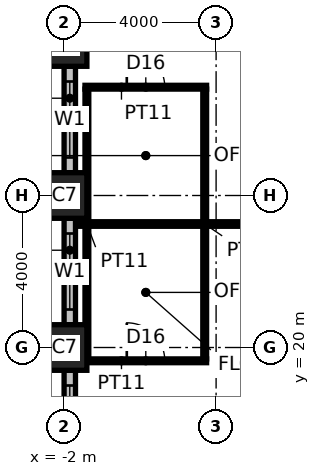
"""IFC4 building model, lengths in metres.
Left out: names, types, materials, properties, quantities, classifications, styles, units other than length and angle.
Written with IfcOpenShell. Run it as: python <this file> out.ifc"""

import sys

from ifc_helpers import new_model, si_unit, direction, frame, frame_2d, origin, origin_2d, place, context, subcontext, project, spatial, rectangle, hollow_rectangle, extrude, element, fill, save


model = new_model("IFC4")
c1 = context("Model", 3, precision=1e-05, world=origin(), true_north=direction((0.0, 1.0)))
c2 = subcontext(c1, "Body", "Model", "MODEL_VIEW")
j1 = project(units=[si_unit("LENGTHUNIT", "METRE"), si_unit("PLANEANGLEUNIT", "RADIAN")], contexts=[c1])
p1 = place(None, origin())
s1 = spatial("IfcSite", under=j1, at=p1, CompositionType="ELEMENT")
p2 = place(p1, origin())
s2 = spatial("IfcBuilding", under=s1, at=p2, CompositionType="ELEMENT")
p3 = place(p2, frame((0.0, 0.0, 27.0)))
s3 = spatial("IfcBuildingStorey", under=s2, at=p3, CompositionType="ELEMENT", Elevation=27.0)
for number, where, z_axis, x_axis in (
    (1, (-2.0, 20.0, 0.0), (0.0, 0.0, 1.0), (1.0, 0.0, 0.0)),
    (2, (-2.0, 24.0, 0.0), (0.0, 0.0, 1.0), (1.0, 0.0, 0.0)),
    (3, (-2.0, 28.0, 0.0), (0.0, 0.0, 1.0), (1.0, 0.0, 0.0)),
):
    element("IfcColumn", number, at=place(p3, frame(where, z_axis=z_axis, x_axis=x_axis)), inside=s3, PredefinedType="COLUMN", context=c2, shape_type="SweptSolid", body=[
        extrude(hollow_rectangle(XDim=1.2, YDim=1.2, WallThickness=0.1, at=origin_2d()), origin(), (0.0, 0.0, 1.0), 4.0),
    ])
p4 = place(p3, frame((-1.7, 23.25, 0.0), z_axis=(0.0, 0.0, 1.0), x_axis=(1.0, 0.0, 0.0)))
e4 = element("IfcWall", 4, at=p4, inside=s3, PredefinedType="PARTITIONING", context=c2, shape_type="SweptSolid", body=[
    extrude(rectangle(XDim=16.725, YDim=0.12, at=frame_2d((8.362, 0.0))), origin(), (0.0, 0.0, 1.0), 3.85),
])
p5 = place(p3, frame((-1.45, 19.65, 0.0), z_axis=(0.0, 0.0, 1.0), x_axis=(1.0, 0.0, 0.0)))
e5 = element("IfcWall", 5, at=p5, inside=s3, PredefinedType="PARTITIONING", context=c2, shape_type="SweptSolid", body=[
    extrude(rectangle(XDim=3.2, YDim=0.1, at=frame_2d((1.6, 0.0))), origin(), (0.0, 0.0, 1.0), 2.85),
])
p6 = place(p5, frame((1.1, 0.0, 0.0)))
e6 = element("IfcOpeningElement", 6, at=p6, cuts=e5, PredefinedType="OPENING", context=c2, shape_type="SweptSolid", body=[
    extrude(rectangle(XDim=1.0, YDim=2.2, at=frame_2d((0.5, 1.1))), frame((0.0, 0.06, 0.0), z_axis=(0.0, -1.0, 0.0), x_axis=(1.0, 0.0, 0.0)), (0.0, 0.0, 1.0), 0.12),
])
p7 = place(p3, frame((-1.45, 26.85, 0.0), z_axis=(0.0, 0.0, 1.0), x_axis=(1.0, 0.0, 0.0)))
e7 = element("IfcWall", 7, at=p7, inside=s3, PredefinedType="PARTITIONING", context=c2, shape_type="SweptSolid", body=[
    extrude(rectangle(XDim=3.2, YDim=0.1, at=frame_2d((1.6, 0.0))), origin(), (0.0, 0.0, 1.0), 3.85),
])
p8 = place(p7, frame((1.1, 0.0, 0.0)))
e8 = element("IfcOpeningElement", 8, at=p8, cuts=e7, PredefinedType="OPENING", context=c2, shape_type="SweptSolid", body=[
    extrude(rectangle(XDim=1.0, YDim=2.2, at=frame_2d((0.5, 1.1))), frame((0.0, 0.06, 0.0), z_axis=(0.0, -1.0, 0.0), x_axis=(1.0, 0.0, 0.0)), (0.0, 0.0, 1.0), 0.12),
])
for number, where, z_axis, x_axis in (
    (9, (-1.4, 19.7, 0.0), (0.0, 0.0, 1.0), (0.0, 1.0, 0.0)),
    (10, (1.7, 19.7, 0.0), (0.0, 0.0, 1.0), (0.0, 1.0, 0.0)),
):
    element("IfcWall", number, at=place(p3, frame(where, z_axis=z_axis, x_axis=x_axis)), inside=s3, PredefinedType="PARTITIONING", context=c2, shape_type="SweptSolid", body=[
        extrude(rectangle(XDim=7.1, YDim=0.1, at=frame_2d((3.55, 0.0))), origin(), (0.0, 0.0, 1.0), 3.85),
    ])
p9 = place(p3, frame((-1.85, 19.4, 0.0), z_axis=(0.0, 0.0, 1.0), x_axis=(0.0, -1.0, 0.0)))
e11 = element("IfcWall", 11, at=p9, inside=s3, PredefinedType="ELEMENTEDWALL", context=c2, shape_type="SweptSolid", body=[
    extrude(rectangle(XDim=2.8, YDim=0.3, at=frame_2d((1.4, 0.0))), origin(), (0.0, 0.0, 1.0), 2.85),
])
p10 = place(p9, frame((0.4, 0.0, 0.8)))
e12 = element("IfcOpeningElement", 12, at=p10, cuts=e11, PredefinedType="OPENING", context=c2, shape_type="SweptSolid", body=[
    extrude(rectangle(XDim=2.0, YDim=2.0, at=frame_2d((1.0, 1.0))), frame((0.0, 0.16, 0.0), z_axis=(0.0, -1.0, 0.0), x_axis=(1.0, 0.0, 0.0)), (0.0, 0.0, 1.0), 0.32),
])
p11 = place(p3, frame((-1.85, 23.4, 0.0), z_axis=(0.0, 0.0, 1.0), x_axis=(0.0, -1.0, 0.0)))
e13 = element("IfcWall", 13, at=p11, inside=s3, PredefinedType="ELEMENTEDWALL", context=c2, shape_type="SweptSolid", body=[
    extrude(rectangle(XDim=2.8, YDim=0.3, at=frame_2d((1.4, 0.0))), origin(), (0.0, 0.0, 1.0), 2.85),
])
p12 = place(p11, frame((0.4, 0.0, 0.8)))
e14 = element("IfcOpeningElement", 14, at=p12, cuts=e13, PredefinedType="OPENING", context=c2, shape_type="SweptSolid", body=[
    extrude(rectangle(XDim=2.0, YDim=2.0, at=frame_2d((1.0, 1.0))), frame((0.0, 0.16, 0.0), z_axis=(0.0, -1.0, 0.0), x_axis=(1.0, 0.0, 0.0)), (0.0, 0.0, 1.0), 0.32),
])
p13 = place(p3, frame((-1.85, 27.4, 0.0), z_axis=(0.0, 0.0, 1.0), x_axis=(0.0, -1.0, 0.0)))
e15 = element("IfcWall", 15, at=p13, inside=s3, PredefinedType="ELEMENTEDWALL", context=c2, shape_type="SweptSolid", body=[
    extrude(rectangle(XDim=2.8, YDim=0.3, at=frame_2d((1.4, 0.0))), origin(), (0.0, 0.0, 1.0), 2.85),
])
p14 = place(p13, frame((0.4, 0.0, 0.8)))
e16 = element("IfcOpeningElement", 16, at=p14, cuts=e15, PredefinedType="OPENING", context=c2, shape_type="SweptSolid", body=[
    extrude(rectangle(XDim=2.0, YDim=2.0, at=frame_2d((1.0, 1.0))), frame((0.0, 0.16, 0.0), z_axis=(0.0, -1.0, 0.0), x_axis=(1.0, 0.0, 0.0)), (0.0, 0.0, 1.0), 0.32),
])
p15 = place(p6, origin())
e17 = element("IfcDoor", 17, at=p15, inside=s3, OperationType="SINGLE_SWING_LEFT", PredefinedType="DOOR", context=c2, shape_type="SweptSolid", body=[
    extrude(rectangle(XDim=1.0, YDim=2.2, at=frame_2d((0.5, 1.1))), frame((0.0, 0.025, 0.0), z_axis=(0.0, -1.0, 0.0), x_axis=(1.0, 0.0, 0.0)), (0.0, 0.0, 1.0), 0.05),
])
fill(e6, e17)
p16 = place(p8, origin())
e18 = element("IfcDoor", 18, at=p16, inside=s3, OperationType="SINGLE_SWING_LEFT", PredefinedType="DOOR", context=c2, shape_type="SweptSolid", body=[
    extrude(rectangle(XDim=1.0, YDim=2.2, at=frame_2d((0.5, 1.1))), frame((0.0, 0.025, 0.0), z_axis=(0.0, -1.0, 0.0), x_axis=(1.0, 0.0, 0.0)), (0.0, 0.0, 1.0), 0.05),
])
fill(e8, e18)
p17 = place(p10, origin())
e19 = element("IfcWindow", 19, at=p17, inside=s3, PartitioningType="SINGLE_PANEL", PredefinedType="WINDOW", context=c2, shape_type="SweptSolid", body=[
    extrude(rectangle(XDim=2.0, YDim=2.0, at=frame_2d((1.0, 1.0))), frame((0.0, 0.03, 0.0), z_axis=(0.0, -1.0, 0.0), x_axis=(1.0, 0.0, 0.0)), (0.0, 0.0, 1.0), 0.06),
])
fill(e12, e19)
p18 = place(p12, origin())
e20 = element("IfcWindow", 20, at=p18, inside=s3, PartitioningType="SINGLE_PANEL", PredefinedType="WINDOW", context=c2, shape_type="SweptSolid", body=[
    extrude(rectangle(XDim=2.0, YDim=2.0, at=frame_2d((1.0, 1.0))), frame((0.0, 0.03, 0.0), z_axis=(0.0, -1.0, 0.0), x_axis=(1.0, 0.0, 0.0)), (0.0, 0.0, 1.0), 0.06),
])
fill(e14, e20)
p19 = place(p14, origin())
e21 = element("IfcWindow", 21, at=p19, inside=s3, PartitioningType="SINGLE_PANEL", PredefinedType="WINDOW", context=c2, shape_type="SweptSolid", body=[
    extrude(rectangle(XDim=2.0, YDim=2.0, at=frame_2d((1.0, 1.0))), frame((0.0, 0.03, 0.0), z_axis=(0.0, -1.0, 0.0), x_axis=(1.0, 0.0, 0.0)), (0.0, 0.0, 1.0), 0.06),
])
fill(e16, e21)
save(model, sys.argv[1])
